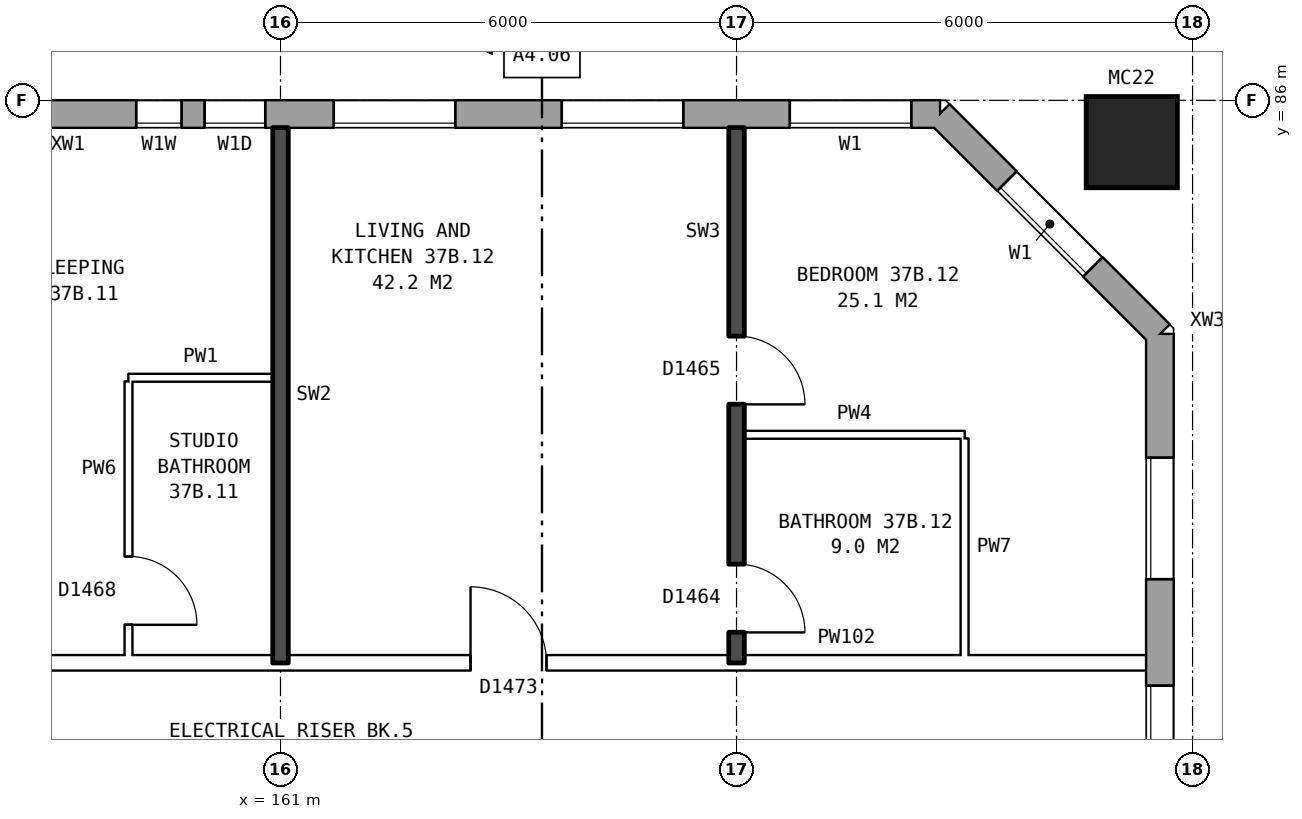
"""IFC4 building model, lengths in metres.
Left out: names, types, materials, properties, quantities, classifications, styles, units other than length and angle.
Written with IfcOpenShell. Run it as: python <this file> out.ifc"""

import sys

from ifc_helpers import new_model, si_unit, direction, frame, frame_2d, origin, origin_2d, place, context, subcontext, project, spatial, rectangle, hollow_rectangle, extrude, element, fill, save


model = new_model("IFC4")
c1 = context("Model", 3, precision=1e-05, world=origin(), true_north=direction((0.0, 1.0)))
c2 = subcontext(c1, "Body", "Model", "MODEL_VIEW")
j1 = project(units=[si_unit("LENGTHUNIT", "METRE"), si_unit("PLANEANGLEUNIT", "RADIAN")], contexts=[c1])
p1 = place(None, origin())
s1 = spatial("IfcSite", under=j1, at=p1, CompositionType="ELEMENT")
p2 = place(p1, origin())
s2 = spatial("IfcBuilding", under=s1, at=p2, CompositionType="ELEMENT")
p3 = place(p2, frame((0.0, 0.0, 133.0)))
s3 = spatial("IfcBuildingStorey", under=s2, at=p3, CompositionType="ELEMENT", Elevation=133.0)
p4 = place(p3, frame((172.2, 85.45, 0.0), z_axis=(0.0, 0.0, 1.0), x_axis=(1.0, 0.0, 0.0)))
e1 = element("IfcColumn", 1, at=p4, inside=s3, PredefinedType="COLUMN", context=c2, shape_type="SweptSolid", body=[
    extrude(hollow_rectangle(XDim=1.2, YDim=1.2, WallThickness=0.065, at=origin_2d()), origin(), (0.0, 0.0, 1.0), 3.1),
])
p5 = place(p3, frame((172.57, 57.075, 0.0), z_axis=(0.0, 0.0, 1.0), x_axis=(0.0, 1.0, 0.0)))
e2 = element("IfcWall", 2, at=p5, inside=s3, PredefinedType="STANDARD", context=c2, shape_type="SweptSolid", body=[
    extrude(rectangle(XDim=25.851, YDim=0.36, at=frame_2d((12.925, 0.0))), origin(), (0.0, 0.0, 1.0), 2.85),
])
p6 = place(p5, frame((1.625, 0.0, 0.8)))
e3 = element("IfcOpeningElement", 3, at=p6, cuts=e2, PredefinedType="OPENING", context=c2, shape_type="SweptSolid", body=[
    extrude(rectangle(XDim=1.6, YDim=1.8, at=frame_2d((0.8, 0.9))), frame((0.0, 0.19, 0.0), z_axis=(0.0, -1.0, 0.0), x_axis=(1.0, 0.0, 0.0)), (0.0, 0.0, 1.0), 0.38),
])
p7 = place(p5, frame((4.625, 0.0, 0.8)))
e4 = element("IfcOpeningElement", 4, at=p7, cuts=e2, PredefinedType="OPENING", context=c2, shape_type="SweptSolid", body=[
    extrude(rectangle(XDim=1.6, YDim=1.8, at=frame_2d((0.8, 0.9))), frame((0.0, 0.19, 0.0), z_axis=(0.0, -1.0, 0.0), x_axis=(1.0, 0.0, 0.0)), (0.0, 0.0, 1.0), 0.38),
])
p8 = place(p5, frame((8.025, 0.0, 1.7)))
e5 = element("IfcOpeningElement", 5, at=p8, cuts=e2, PredefinedType="OPENING", context=c2, shape_type="SweptSolid", body=[
    extrude(rectangle(XDim=1.0, YDim=0.9, at=frame_2d((0.5, 0.45))), frame((0.0, 0.19, 0.0), z_axis=(0.0, -1.0, 0.0), x_axis=(1.0, 0.0, 0.0)), (0.0, 0.0, 1.0), 0.38),
])
p9 = place(p5, frame((10.625, 0.0, 0.8)))
e6 = element("IfcOpeningElement", 6, at=p9, cuts=e2, PredefinedType="OPENING", context=c2, shape_type="SweptSolid", body=[
    extrude(rectangle(XDim=1.6, YDim=1.8, at=frame_2d((0.8, 0.9))), frame((0.0, 0.19, 0.0), z_axis=(0.0, -1.0, 0.0), x_axis=(1.0, 0.0, 0.0)), (0.0, 0.0, 1.0), 0.38),
])
p10 = place(p5, frame((13.625, 0.0, 0.8)))
e7 = element("IfcOpeningElement", 7, at=p10, cuts=e2, PredefinedType="OPENING", context=c2, shape_type="SweptSolid", body=[
    extrude(rectangle(XDim=1.6, YDim=1.8, at=frame_2d((0.8, 0.9))), frame((0.0, 0.19, 0.0), z_axis=(0.0, -1.0, 0.0), x_axis=(1.0, 0.0, 0.0)), (0.0, 0.0, 1.0), 0.38),
])
p11 = place(p5, frame((9.325, 0.0, 0.8)))
e8 = element("IfcOpeningElement", 8, at=p11, cuts=e2, PredefinedType="OPENING", context=c2, shape_type="SweptSolid", body=[
    extrude(rectangle(XDim=1.0, YDim=1.8, at=frame_2d((0.5, 0.9))), frame((0.0, 0.19, 0.0), z_axis=(0.0, -1.0, 0.0), x_axis=(1.0, 0.0, 0.0)), (0.0, 0.0, 1.0), 0.38),
])
p12 = place(p5, frame((19.625, 0.0, 0.8)))
e9 = element("IfcOpeningElement", 9, at=p12, cuts=e2, PredefinedType="OPENING", context=c2, shape_type="SweptSolid", body=[
    extrude(rectangle(XDim=1.6, YDim=1.8, at=frame_2d((0.8, 0.9))), frame((0.0, 0.19, 0.0), z_axis=(0.0, -1.0, 0.0), x_axis=(1.0, 0.0, 0.0)), (0.0, 0.0, 1.0), 0.38),
])
p13 = place(p5, frame((22.625, 0.0, 0.8)))
e10 = element("IfcOpeningElement", 10, at=p13, cuts=e2, PredefinedType="OPENING", context=c2, shape_type="SweptSolid", body=[
    extrude(rectangle(XDim=1.6, YDim=1.8, at=frame_2d((0.8, 0.9))), frame((0.0, 0.19, 0.0), z_axis=(0.0, -1.0, 0.0), x_axis=(1.0, 0.0, 0.0)), (0.0, 0.0, 1.0), 0.38),
])
p14 = place(p5, frame((12.525, 0.0, 0.8)))
e11 = element("IfcOpeningElement", 11, at=p14, cuts=e2, PredefinedType="OPENING", context=c2, shape_type="SweptSolid", body=[
    extrude(rectangle(XDim=0.8, YDim=1.8, at=frame_2d((0.4, 0.9))), frame((0.0, 0.19, 0.0), z_axis=(0.0, -1.0, 0.0), x_axis=(1.0, 0.0, 0.0)), (0.0, 0.0, 1.0), 0.38),
])
p15 = place(p5, frame((15.525, 0.0, 0.8)))
e12 = element("IfcOpeningElement", 12, at=p15, cuts=e2, PredefinedType="OPENING", context=c2, shape_type="SweptSolid", body=[
    extrude(rectangle(XDim=1.0, YDim=1.8, at=frame_2d((0.5, 0.9))), frame((0.0, 0.19, 0.0), z_axis=(0.0, -1.0, 0.0), x_axis=(1.0, 0.0, 0.0)), (0.0, 0.0, 1.0), 0.38),
])
p16 = place(p5, frame((16.825, 0.0, 1.7)))
e13 = element("IfcOpeningElement", 13, at=p16, cuts=e2, PredefinedType="OPENING", context=c2, shape_type="SweptSolid", body=[
    extrude(rectangle(XDim=1.0, YDim=0.9, at=frame_2d((0.5, 0.45))), frame((0.0, 0.19, 0.0), z_axis=(0.0, -1.0, 0.0), x_axis=(1.0, 0.0, 0.0)), (0.0, 0.0, 1.0), 0.38),
])
p17 = place(p3, frame((172.57, 82.925, 0.0), z_axis=(0.0, 0.0, 1.0), x_axis=(-0.707106781187, 0.707106781187, 0.0)))
e14 = element("IfcWall", 14, at=p17, inside=s3, PredefinedType="STANDARD", context=c2, shape_type="SweptSolid", body=[
    extrude(rectangle(XDim=4.094, YDim=0.36, at=frame_2d((2.047, 0.0))), origin(), (0.0, 0.0, 1.0), 2.85),
])
p18 = place(p17, frame((1.247, 0.0, 0.8)))
e15 = element("IfcOpeningElement", 15, at=p18, cuts=e14, PredefinedType="OPENING", context=c2, shape_type="SweptSolid", body=[
    extrude(rectangle(XDim=1.6, YDim=1.8, at=frame_2d((0.8, 0.9))), frame((0.0, 0.19, 0.0), z_axis=(0.0, -1.0, 0.0), x_axis=(1.0, 0.0, 0.0)), (0.0, 0.0, 1.0), 0.38),
])
p19 = place(p3, frame((169.675, 85.82, 0.0), z_axis=(0.0, 0.0, 1.0), x_axis=(-1.0, 0.0, 0.0)))
e16 = element("IfcWall", 16, at=p19, inside=s3, PredefinedType="STANDARD", context=c2, shape_type="SweptSolid", body=[
    extrude(rectangle(XDim=35.601, YDim=0.36, at=frame_2d((17.8, 0.0))), origin(), (0.0, 0.0, 1.0), 2.85),
])
p20 = place(p19, frame((0.375, 0.0, 0.8)))
e17 = element("IfcOpeningElement", 17, at=p20, cuts=e16, PredefinedType="OPENING", context=c2, shape_type="SweptSolid", body=[
    extrude(rectangle(XDim=1.6, YDim=1.8, at=frame_2d((0.8, 0.9))), frame((0.0, 0.19, 0.0), z_axis=(0.0, -1.0, 0.0), x_axis=(1.0, 0.0, 0.0)), (0.0, 0.0, 1.0), 0.38),
])
p21 = place(p19, frame((3.375, 0.0, 0.8)))
e18 = element("IfcOpeningElement", 18, at=p21, cuts=e16, PredefinedType="OPENING", context=c2, shape_type="SweptSolid", body=[
    extrude(rectangle(XDim=1.6, YDim=1.8, at=frame_2d((0.8, 0.9))), frame((0.0, 0.19, 0.0), z_axis=(0.0, -1.0, 0.0), x_axis=(1.0, 0.0, 0.0)), (0.0, 0.0, 1.0), 0.38),
])
p22 = place(p19, frame((6.375, 0.0, 0.8)))
e19 = element("IfcOpeningElement", 19, at=p22, cuts=e16, PredefinedType="OPENING", context=c2, shape_type="SweptSolid", body=[
    extrude(rectangle(XDim=1.6, YDim=1.8, at=frame_2d((0.8, 0.9))), frame((0.0, 0.19, 0.0), z_axis=(0.0, -1.0, 0.0), x_axis=(1.0, 0.0, 0.0)), (0.0, 0.0, 1.0), 0.38),
])
p23 = place(p19, frame((8.875, 0.0, 0.8)))
e20 = element("IfcOpeningElement", 20, at=p23, cuts=e16, PredefinedType="OPENING", context=c2, shape_type="SweptSolid", body=[
    extrude(rectangle(XDim=0.8, YDim=1.8, at=frame_2d((0.4, 0.9))), frame((0.0, 0.19, 0.0), z_axis=(0.0, -1.0, 0.0), x_axis=(1.0, 0.0, 0.0)), (0.0, 0.0, 1.0), 0.38),
])
p24 = place(p19, frame((12.375, 0.0, 0.8)))
e21 = element("IfcOpeningElement", 21, at=p24, cuts=e16, PredefinedType="OPENING", context=c2, shape_type="SweptSolid", body=[
    extrude(rectangle(XDim=1.6, YDim=1.8, at=frame_2d((0.8, 0.9))), frame((0.0, 0.19, 0.0), z_axis=(0.0, -1.0, 0.0), x_axis=(1.0, 0.0, 0.0)), (0.0, 0.0, 1.0), 0.38),
])
p25 = place(p19, frame((15.375, 0.0, 0.8)))
e22 = element("IfcOpeningElement", 22, at=p25, cuts=e16, PredefinedType="OPENING", context=c2, shape_type="SweptSolid", body=[
    extrude(rectangle(XDim=1.6, YDim=1.8, at=frame_2d((0.8, 0.9))), frame((0.0, 0.19, 0.0), z_axis=(0.0, -1.0, 0.0), x_axis=(1.0, 0.0, 0.0)), (0.0, 0.0, 1.0), 0.38),
])
p26 = place(p19, frame((18.375, 0.0, 0.8)))
e23 = element("IfcOpeningElement", 23, at=p26, cuts=e16, PredefinedType="OPENING", context=c2, shape_type="SweptSolid", body=[
    extrude(rectangle(XDim=1.6, YDim=1.8, at=frame_2d((0.8, 0.9))), frame((0.0, 0.19, 0.0), z_axis=(0.0, -1.0, 0.0), x_axis=(1.0, 0.0, 0.0)), (0.0, 0.0, 1.0), 0.38),
])
p27 = place(p19, frame((21.375, 0.0, 0.8)))
e24 = element("IfcOpeningElement", 24, at=p27, cuts=e16, PredefinedType="OPENING", context=c2, shape_type="SweptSolid", body=[
    extrude(rectangle(XDim=1.6, YDim=1.8, at=frame_2d((0.8, 0.9))), frame((0.0, 0.19, 0.0), z_axis=(0.0, -1.0, 0.0), x_axis=(1.0, 0.0, 0.0)), (0.0, 0.0, 1.0), 0.38),
])
p28 = place(p19, frame((23.825, 0.0, 0.15)))
e25 = element("IfcOpeningElement", 25, at=p28, cuts=e16, PredefinedType="OPENING", context=c2, shape_type="SweptSolid", body=[
    extrude(rectangle(XDim=0.6, YDim=0.9, at=frame_2d((0.3, 0.45))), frame((0.0, 0.19, 0.0), z_axis=(0.0, -1.0, 0.0), x_axis=(1.0, 0.0, 0.0)), (0.0, 0.0, 1.0), 0.38),
])
p29 = place(p19, frame((27.375, 0.0, 0.8)))
e26 = element("IfcOpeningElement", 26, at=p29, cuts=e16, PredefinedType="OPENING", context=c2, shape_type="SweptSolid", body=[
    extrude(rectangle(XDim=1.6, YDim=1.8, at=frame_2d((0.8, 0.9))), frame((0.0, 0.19, 0.0), z_axis=(0.0, -1.0, 0.0), x_axis=(1.0, 0.0, 0.0)), (0.0, 0.0, 1.0), 0.38),
])
p30 = place(p19, frame((30.375, 0.0, 0.8)))
e27 = element("IfcOpeningElement", 27, at=p30, cuts=e16, PredefinedType="OPENING", context=c2, shape_type="SweptSolid", body=[
    extrude(rectangle(XDim=1.6, YDim=1.8, at=frame_2d((0.8, 0.9))), frame((0.0, 0.19, 0.0), z_axis=(0.0, -1.0, 0.0), x_axis=(1.0, 0.0, 0.0)), (0.0, 0.0, 1.0), 0.38),
])
p31 = place(p19, frame((33.375, 0.0, 0.8)))
e28 = element("IfcOpeningElement", 28, at=p31, cuts=e16, PredefinedType="OPENING", context=c2, shape_type="SweptSolid", body=[
    extrude(rectangle(XDim=1.6, YDim=1.8, at=frame_2d((0.8, 0.9))), frame((0.0, 0.19, 0.0), z_axis=(0.0, -1.0, 0.0), x_axis=(1.0, 0.0, 0.0)), (0.0, 0.0, 1.0), 0.38),
])
p32 = place(p19, frame((9.975, 0.0, 1.7)))
e29 = element("IfcOpeningElement", 29, at=p32, cuts=e16, PredefinedType="OPENING", context=c2, shape_type="SweptSolid", body=[
    extrude(rectangle(XDim=0.6, YDim=0.9, at=frame_2d((0.3, 0.45))), frame((0.0, 0.19, 0.0), z_axis=(0.0, -1.0, 0.0), x_axis=(1.0, 0.0, 0.0)), (0.0, 0.0, 1.0), 0.38),
])
p33 = place(p19, frame((25.275, 0.0, 1.35)))
e30 = element("IfcOpeningElement", 30, at=p33, cuts=e16, PredefinedType="OPENING", context=c2, shape_type="SweptSolid", body=[
    extrude(rectangle(XDim=1.2, YDim=1.2, at=frame_2d((0.6, 0.6))), frame((0.0, 0.19, 0.0), z_axis=(0.0, -1.0, 0.0), x_axis=(1.0, 0.0, 0.0)), (0.0, 0.0, 1.0), 0.38),
])
p34 = place(p3, frame((155.1, 78.6, 0.0), z_axis=(0.0, 0.0, 1.0), x_axis=(1.0, 0.0, 0.0)))
e31 = element("IfcWall", 31, at=p34, inside=s3, PredefinedType="PARTITIONING", context=c2, shape_type="SweptSolid", body=[
    extrude(rectangle(XDim=17.29, YDim=0.2, at=frame_2d((8.645, 0.0))), origin(), (0.0, 0.0, 1.0), 2.85),
])
p35 = place(p34, frame((1.45, 0.0, 0.0)))
e32 = element("IfcOpeningElement", 32, at=p35, cuts=e31, PredefinedType="OPENING", context=c2, shape_type="SweptSolid", body=[
    extrude(rectangle(XDim=1.0, YDim=2.1, at=frame_2d((0.5, 1.05))), frame((0.0, 0.11, 0.0), z_axis=(0.0, -1.0, 0.0), x_axis=(1.0, 0.0, 0.0)), (0.0, 0.0, 1.0), 0.22),
])
p36 = place(p34, frame((8.4, 0.0, 0.0)))
e33 = element("IfcOpeningElement", 33, at=p36, cuts=e31, PredefinedType="OPENING", context=c2, shape_type="SweptSolid", body=[
    extrude(rectangle(XDim=1.0, YDim=2.1, at=frame_2d((0.5, 1.05))), frame((0.0, 0.11, 0.0), z_axis=(0.0, -1.0, 0.0), x_axis=(1.0, 0.0, 0.0)), (0.0, 0.0, 1.0), 0.22),
])
p37 = place(p3, frame((167.1, 81.6, 0.0), z_axis=(0.0, 0.0, 1.0), x_axis=(1.0, 0.0, 0.0)))
e34 = element("IfcWall", 34, at=p37, inside=s3, PredefinedType="PARTITIONING", context=c2, shape_type="SweptSolid", body=[
    extrude(rectangle(XDim=2.9, YDim=0.1, at=frame_2d((1.45, 0.0))), origin(), (0.0, 0.0, 1.0), 2.85),
])
p38 = place(p3, frame((159.0, 82.35, 0.0), z_axis=(0.0, 0.0, 1.0), x_axis=(1.0, 0.0, 0.0)))
e35 = element("IfcWall", 35, at=p38, inside=s3, PredefinedType="PARTITIONING", context=c2, shape_type="SweptSolid", body=[
    extrude(rectangle(XDim=1.9, YDim=0.1, at=frame_2d((0.95, 0.0))), origin(), (0.0, 0.0, 1.0), 2.85),
])
p39 = place(p3, frame((159.0, 78.7, 0.0), z_axis=(0.0, 0.0, 1.0), x_axis=(0.0, 1.0, 0.0)))
e36 = element("IfcWall", 36, at=p39, inside=s3, PredefinedType="PARTITIONING", context=c2, shape_type="SweptSolid", body=[
    extrude(rectangle(XDim=3.6, YDim=0.1, at=frame_2d((1.8, 0.0))), origin(), (0.0, 0.0, 1.0), 2.85),
])
p40 = place(p39, frame((0.4, 0.0, 0.0)))
e37 = element("IfcOpeningElement", 37, at=p40, cuts=e36, PredefinedType="OPENING", context=c2, shape_type="SweptSolid", body=[
    extrude(rectangle(XDim=0.9, YDim=2.1, at=frame_2d((0.45, 1.05))), frame((0.0, 0.06, 0.0), z_axis=(0.0, -1.0, 0.0), x_axis=(1.0, 0.0, 0.0)), (0.0, 0.0, 1.0), 0.12),
])
p41 = place(p3, frame((161.0, 78.6, 0.0), z_axis=(0.0, 0.0, 1.0), x_axis=(0.0, 1.0, 0.0)))
e38 = element("IfcWall", 38, at=p41, inside=s3, PredefinedType="SOLIDWALL", context=c2, shape_type="SweptSolid", body=[
    extrude(rectangle(XDim=7.04, YDim=0.2, at=frame_2d((3.52, 0.0))), origin(), (0.0, 0.0, 1.0), 2.85),
])
p42 = place(p3, frame((167.0, 78.6, 0.0), z_axis=(0.0, 0.0, 1.0), x_axis=(0.0, 1.0, 0.0)))
e39 = element("IfcWall", 39, at=p42, inside=s3, PredefinedType="SOLIDWALL", context=c2, shape_type="SweptSolid", body=[
    extrude(rectangle(XDim=7.04, YDim=0.2, at=frame_2d((3.52, 0.0))), origin(), (0.0, 0.0, 1.0), 2.85),
])
p43 = place(p42, frame((3.4, 0.0, 0.0)))
e40 = element("IfcOpeningElement", 40, at=p43, cuts=e39, PredefinedType="OPENING", context=c2, shape_type="SweptSolid", body=[
    extrude(rectangle(XDim=0.9, YDim=2.1, at=frame_2d((0.45, 1.05))), frame((0.0, 0.11, 0.0), z_axis=(0.0, -1.0, 0.0), x_axis=(1.0, 0.0, 0.0)), (0.0, 0.0, 1.0), 0.22),
])
p44 = place(p42, frame((0.4, 0.0, 0.0)))
e41 = element("IfcOpeningElement", 41, at=p44, cuts=e39, PredefinedType="OPENING", context=c2, shape_type="SweptSolid", body=[
    extrude(rectangle(XDim=0.9, YDim=2.1, at=frame_2d((0.45, 1.05))), frame((0.0, 0.11, 0.0), z_axis=(0.0, -1.0, 0.0), x_axis=(1.0, 0.0, 0.0)), (0.0, 0.0, 1.0), 0.22),
])
p45 = place(p3, frame((170.0, 78.7, 0.0), z_axis=(0.0, 0.0, 1.0), x_axis=(0.0, 1.0, 0.0)))
e42 = element("IfcWall", 42, at=p45, inside=s3, PredefinedType="PARTITIONING", context=c2, shape_type="SweptSolid", body=[
    extrude(rectangle(XDim=2.85, YDim=0.1, at=frame_2d((1.425, 0.0))), origin(), (0.0, 0.0, 1.0), 2.85),
])
p46 = place(p12, origin())
e43 = element("IfcWindow", 43, at=p46, inside=s3, PartitioningType="SINGLE_PANEL", PredefinedType="WINDOW", context=c2, shape_type="SweptSolid", body=[
    extrude(rectangle(XDim=1.6, YDim=1.8, at=frame_2d((0.8, 0.9))), frame((0.0, 0.15, 0.0), z_axis=(0.0, -1.0, 0.0), x_axis=(1.0, 0.0, 0.0)), (0.0, 0.0, 1.0), 0.06),
])
fill(e9, e43)
p47 = place(p13, origin())
e44 = element("IfcWindow", 44, at=p47, inside=s3, PartitioningType="SINGLE_PANEL", PredefinedType="WINDOW", context=c2, shape_type="SweptSolid", body=[
    extrude(rectangle(XDim=1.6, YDim=1.8, at=frame_2d((0.8, 0.9))), frame((0.0, 0.15, 0.0), z_axis=(0.0, -1.0, 0.0), x_axis=(1.0, 0.0, 0.0)), (0.0, 0.0, 1.0), 0.06),
])
fill(e10, e44)
p48 = place(p18, origin())
e45 = element("IfcWindow", 45, at=p48, inside=s3, PartitioningType="SINGLE_PANEL", PredefinedType="WINDOW", context=c2, shape_type="SweptSolid", body=[
    extrude(rectangle(XDim=1.6, YDim=1.8, at=frame_2d((0.8, 0.9))), frame((0.0, 0.15, 0.0), z_axis=(0.0, -1.0, 0.0), x_axis=(1.0, 0.0, 0.0)), (0.0, 0.0, 1.0), 0.06),
])
fill(e15, e45)
p49 = place(p20, origin())
e46 = element("IfcWindow", 46, at=p49, inside=s3, PartitioningType="SINGLE_PANEL", PredefinedType="WINDOW", context=c2, shape_type="SweptSolid", body=[
    extrude(rectangle(XDim=1.6, YDim=1.8, at=frame_2d((0.8, 0.9))), frame((0.0, 0.15, 0.0), z_axis=(0.0, -1.0, 0.0), x_axis=(1.0, 0.0, 0.0)), (0.0, 0.0, 1.0), 0.06),
])
fill(e17, e46)
p50 = place(p21, origin())
e47 = element("IfcWindow", 47, at=p50, inside=s3, PartitioningType="SINGLE_PANEL", PredefinedType="WINDOW", context=c2, shape_type="SweptSolid", body=[
    extrude(rectangle(XDim=1.6, YDim=1.8, at=frame_2d((0.8, 0.9))), frame((0.0, 0.15, 0.0), z_axis=(0.0, -1.0, 0.0), x_axis=(1.0, 0.0, 0.0)), (0.0, 0.0, 1.0), 0.06),
])
fill(e18, e47)
p51 = place(p22, origin())
e48 = element("IfcWindow", 48, at=p51, inside=s3, PartitioningType="SINGLE_PANEL", PredefinedType="WINDOW", context=c2, shape_type="SweptSolid", body=[
    extrude(rectangle(XDim=1.6, YDim=1.8, at=frame_2d((0.8, 0.9))), frame((0.0, 0.15, 0.0), z_axis=(0.0, -1.0, 0.0), x_axis=(1.0, 0.0, 0.0)), (0.0, 0.0, 1.0), 0.06),
])
fill(e19, e48)
p52 = place(p23, origin())
e49 = element("IfcWindow", 49, at=p52, inside=s3, PartitioningType="SINGLE_PANEL", PredefinedType="WINDOW", context=c2, shape_type="SweptSolid", body=[
    extrude(rectangle(XDim=0.8, YDim=1.8, at=frame_2d((0.4, 0.9))), frame((0.0, 0.15, 0.0), z_axis=(0.0, -1.0, 0.0), x_axis=(1.0, 0.0, 0.0)), (0.0, 0.0, 1.0), 0.06),
])
fill(e20, e49)
p53 = place(p40, frame((0.9, 0.0, 0.0), z_axis=(0.0, 0.0, 1.0), x_axis=(-1.0, 0.0, 0.0)))
e50 = element("IfcDoor", 50, at=p53, inside=s3, OperationType="SINGLE_SWING_RIGHT", PredefinedType="DOOR", context=c2, shape_type="SweptSolid", body=[
    extrude(rectangle(XDim=0.9, YDim=2.1, at=frame_2d((0.45, 1.05))), frame((0.0, 0.025, 0.0), z_axis=(0.0, -1.0, 0.0), x_axis=(1.0, 0.0, 0.0)), (0.0, 0.0, 1.0), 0.05),
])
fill(e37, e50)
p54 = place(p43, frame((0.9, 0.0, 0.0), z_axis=(0.0, 0.0, 1.0), x_axis=(-1.0, 0.0, 0.0)))
e51 = element("IfcDoor", 51, at=p54, inside=s3, OperationType="SINGLE_SWING_RIGHT", PredefinedType="DOOR", context=c2, shape_type="SweptSolid", body=[
    extrude(rectangle(XDim=0.9, YDim=2.1, at=frame_2d((0.45, 1.05))), frame((0.0, 0.025, 0.0), z_axis=(0.0, -1.0, 0.0), x_axis=(1.0, 0.0, 0.0)), (0.0, 0.0, 1.0), 0.05),
])
fill(e40, e51)
p55 = place(p36, origin())
e52 = element("IfcDoor", 52, at=p55, inside=s3, OperationType="SINGLE_SWING_LEFT", PredefinedType="DOOR", context=c2, shape_type="SweptSolid", body=[
    extrude(rectangle(XDim=1.0, YDim=2.1, at=frame_2d((0.5, 1.05))), frame((0.0, 0.025, 0.0), z_axis=(0.0, -1.0, 0.0), x_axis=(1.0, 0.0, 0.0)), (0.0, 0.0, 1.0), 0.05),
])
fill(e33, e52)
p56 = place(p44, frame((0.9, 0.0, 0.0), z_axis=(0.0, 0.0, 1.0), x_axis=(-1.0, 0.0, 0.0)))
e53 = element("IfcDoor", 53, at=p56, inside=s3, OperationType="SINGLE_SWING_RIGHT", PredefinedType="DOOR", context=c2, shape_type="SweptSolid", body=[
    extrude(rectangle(XDim=0.9, YDim=2.1, at=frame_2d((0.45, 1.05))), frame((0.0, 0.025, 0.0), z_axis=(0.0, -1.0, 0.0), x_axis=(1.0, 0.0, 0.0)), (0.0, 0.0, 1.0), 0.05),
])
fill(e41, e53)
p57 = place(p32, origin())
e54 = element("IfcWindow", 54, at=p57, inside=s3, PartitioningType="SINGLE_PANEL", PredefinedType="WINDOW", context=c2, shape_type="SweptSolid", body=[
    extrude(rectangle(XDim=0.6, YDim=0.9, at=frame_2d((0.3, 0.45))), frame((0.0, 0.15, 0.0), z_axis=(0.0, -1.0, 0.0), x_axis=(1.0, 0.0, 0.0)), (0.0, 0.0, 1.0), 0.06),
])
fill(e29, e54)
save(model, sys.argv[1])
